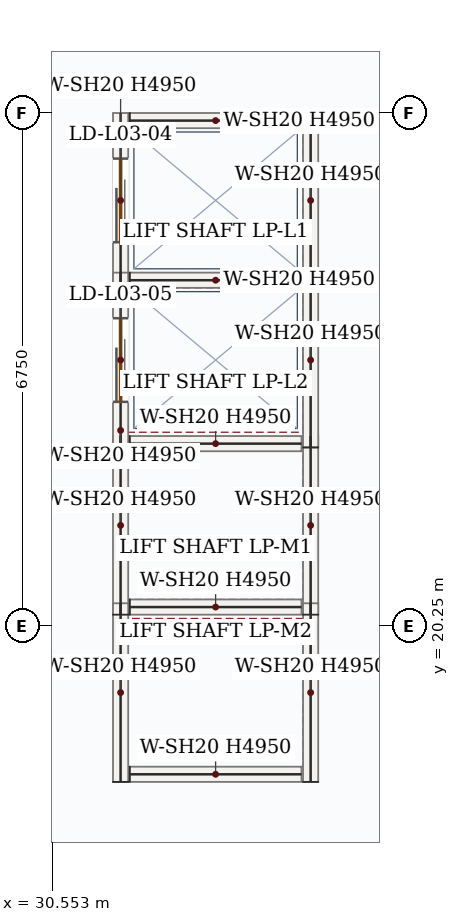
"""IFC4 building model, lengths in metres.
Left out: names, types, materials, properties, quantities, classifications, styles, units other than length and angle.
Written with IfcOpenShell. Run it as: python <this file> out.ifc"""

import sys

from ifc_helpers import new_model, si_unit, direction, frame, frame_2d, origin, place, context, subcontext, project, spatial, rectangle, extrude, source, transform, mapped, element, fill, save


model = new_model("IFC4")
c1 = context("Model", 3, precision=1e-05, world=origin(), true_north=direction((0.0, 1.0)))
c2 = subcontext(c1, "Body", "Model", "MODEL_VIEW")
j1 = project(units=[si_unit("LENGTHUNIT", "METRE"), si_unit("PLANEANGLEUNIT", "RADIAN")], contexts=[c1])
p1 = place(None, origin())
s1 = spatial("IfcSite", under=j1, at=p1, CompositionType="ELEMENT")
p2 = place(p1, origin())
s2 = spatial("IfcBuilding", under=s1, at=p2, CompositionType="ELEMENT")
p3 = place(p2, frame((0.0, 0.0, 18.0)))
s3 = spatial("IfcBuildingStorey", under=s2, at=p3, CompositionType="ELEMENT", Elevation=18.0)
m1 = source(origin(), c2, "Body", "SweptSolid", [
    extrude(rectangle(XDim=2.35, YDim=0.2, at=frame_2d((1.175, 0.0))), origin(), (0.0, 0.0, 1.0), 4.95),
])
for number, where, z_axis, x_axis in (
    (1, (31.45, 20.4, 0.0), (0.0, 0.0, 1.0), (0.0, 1.0, 0.0)),
    (2, (33.95, 20.4, 0.0), (0.0, 0.0, 1.0), (0.0, 1.0, 0.0)),
):
    element("IfcWall", number, at=place(p3, frame(where, z_axis=z_axis, x_axis=x_axis)), inside=s3, PredefinedType="SOLIDWALL", context=c2, shape_type="MappedRepresentation", body=[
        mapped(m1, transform((0.0, 0.0, 0.0), x_axis=(1.0, 0.0, 0.0), y_axis=(0.0, 1.0, 0.0), z_axis=(0.0, 0.0, 1.0), scale=1.0)),
    ])
m2 = source(origin(), c2, "Body", "SweptSolid", [
    extrude(rectangle(XDim=2.26, YDim=0.2, at=frame_2d((1.13, 0.0))), origin(), (0.0, 0.0, 1.0), 4.95),
])
for number, where, z_axis, x_axis in (
    (3, (31.57, 20.5, 0.0), (0.0, 0.0, 1.0), (1.0, 0.0, 0.0)),
    (4, (31.57, 22.65, 0.0), (0.0, 0.0, 1.0), (1.0, 0.0, 0.0)),
):
    element("IfcWall", number, at=place(p3, frame(where, z_axis=z_axis, x_axis=x_axis)), inside=s3, PredefinedType="SOLIDWALL", context=c2, shape_type="MappedRepresentation", body=[
        mapped(m2, transform((0.0, 0.0, 0.0), x_axis=(1.0, 0.0, 0.0), y_axis=(0.0, 1.0, 0.0), z_axis=(0.0, 0.0, 1.0), scale=1.0)),
    ])
for number, where, z_axis, x_axis in (
    (5, (31.45, 18.2, 0.0), (0.0, 0.0, 1.0), (0.0, 1.0, 0.0)),
    (6, (33.95, 18.2, 0.0), (0.0, 0.0, 1.0), (0.0, 1.0, 0.0)),
):
    element("IfcWall", number, at=place(p3, frame(where, z_axis=z_axis, x_axis=x_axis)), inside=s3, PredefinedType="SOLIDWALL", context=c2, shape_type="MappedRepresentation", body=[
        mapped(m1, transform((0.0, 0.0, 0.0), x_axis=(1.0, 0.0, 0.0), y_axis=(0.0, 1.0, 0.0), z_axis=(0.0, 0.0, 1.0), scale=1.0)),
    ])
p4 = place(p3, frame((31.57, 18.3, 0.0), z_axis=(0.0, 0.0, 1.0), x_axis=(1.0, 0.0, 0.0)))
e7 = element("IfcWall", 7, at=p4, inside=s3, PredefinedType="SOLIDWALL", context=c2, shape_type="MappedRepresentation", body=[
    mapped(m2, transform((0.0, 0.0, 0.0), x_axis=(1.0, 0.0, 0.0), y_axis=(0.0, 1.0, 0.0), z_axis=(0.0, 0.0, 1.0), scale=1.0)),
])
p5 = place(p3, frame((31.45, 24.7, 0.0), z_axis=(0.0, 0.0, 1.0), x_axis=(0.0, 1.0, 0.0)))
e8 = element("IfcWall", 8, at=p5, inside=s3, PredefinedType="SOLIDWALL", context=c2, shape_type="SweptSolid", body=[
    extrude(rectangle(XDim=2.3, YDim=0.2, at=frame_2d((1.15, 0.0))), origin(), (0.0, 0.0, 1.0), 4.95),
])
p6 = place(p5, frame((0.6, 0.0, 0.0)))
e9 = element("IfcOpeningElement", 9, at=p6, cuts=e8, PredefinedType="OPENING", context=c2, shape_type="SweptSolid", body=[
    extrude(rectangle(XDim=1.1, YDim=2.15, at=frame_2d((0.55, 1.075))), frame((0.0, 0.11, 0.0), z_axis=(0.0, -1.0, 0.0), x_axis=(1.0, 0.0, 0.0)), (0.0, 0.0, 1.0), 0.22),
])
m3 = source(origin(), c2, "Body", "SweptSolid", [
    extrude(rectangle(XDim=2.3, YDim=0.2, at=frame_2d((1.15, 0.0))), origin(), (0.0, 0.0, 1.0), 4.95),
])
p7 = place(p3, frame((33.95, 24.7, 0.0), z_axis=(0.0, 0.0, 1.0), x_axis=(0.0, 1.0, 0.0)))
e10 = element("IfcWall", 10, at=p7, inside=s3, PredefinedType="SOLIDWALL", context=c2, shape_type="MappedRepresentation", body=[
    mapped(m3, transform((0.0, 0.0, 0.0), x_axis=(1.0, 0.0, 0.0), y_axis=(0.0, 1.0, 0.0), z_axis=(0.0, 0.0, 1.0), scale=1.0)),
])
for number, where, z_axis, x_axis in (
    (11, (31.57, 24.8, 0.0), (0.0, 0.0, 1.0), (1.0, 0.0, 0.0)),
    (12, (31.57, 26.9, 0.0), (0.0, 0.0, 1.0), (1.0, 0.0, 0.0)),
):
    element("IfcWall", number, at=place(p3, frame(where, z_axis=z_axis, x_axis=x_axis)), inside=s3, PredefinedType="SOLIDWALL", context=c2, shape_type="MappedRepresentation", body=[
        mapped(m2, transform((0.0, 0.0, 0.0), x_axis=(1.0, 0.0, 0.0), y_axis=(0.0, 1.0, 0.0), z_axis=(0.0, 0.0, 1.0), scale=1.0)),
    ])
p8 = place(p3, frame((31.45, 22.6, 0.0), z_axis=(0.0, 0.0, 1.0), x_axis=(0.0, 1.0, 0.0)))
e13 = element("IfcWall", 13, at=p8, inside=s3, PredefinedType="SOLIDWALL", context=c2, shape_type="SweptSolid", body=[
    extrude(rectangle(XDim=2.3, YDim=0.2, at=frame_2d((1.15, 0.0))), origin(), (0.0, 0.0, 1.0), 4.95),
])
p9 = place(p8, frame((0.6, 0.0, 0.0)))
e14 = element("IfcOpeningElement", 14, at=p9, cuts=e13, PredefinedType="OPENING", context=c2, shape_type="SweptSolid", body=[
    extrude(rectangle(XDim=1.1, YDim=2.15, at=frame_2d((0.55, 1.075))), frame((0.0, 0.11, 0.0), z_axis=(0.0, -1.0, 0.0), x_axis=(1.0, 0.0, 0.0)), (0.0, 0.0, 1.0), 0.22),
])
m4 = source(origin(), c2, "Body", "SweptSolid", [
    extrude(rectangle(XDim=2.3, YDim=0.2, at=frame_2d((1.15, 0.0))), origin(), (0.0, 0.0, 1.0), 4.95),
])
p10 = place(p3, frame((33.95, 22.6, 0.0), z_axis=(0.0, 0.0, 1.0), x_axis=(0.0, 1.0, 0.0)))
e15 = element("IfcWall", 15, at=p10, inside=s3, PredefinedType="SOLIDWALL", context=c2, shape_type="MappedRepresentation", body=[
    mapped(m4, transform((0.0, 0.0, 0.0), x_axis=(1.0, 0.0, 0.0), y_axis=(0.0, 1.0, 0.0), z_axis=(0.0, 0.0, 1.0), scale=1.0)),
])
m5 = source(origin(), c2, "Body", "SweptSolid", [
    extrude(rectangle(XDim=1.1, YDim=2.15, at=frame_2d((0.55, 1.075))), frame((0.0, 0.025, 0.0), z_axis=(0.0, -1.0, 0.0), x_axis=(1.0, 0.0, 0.0)), (0.0, 0.0, 1.0), 0.05),
])
p11 = place(p6, origin())
e16 = element("IfcDoor", 16, at=p11, inside=s3, OperationType="DOUBLE_DOOR_SLIDING", PredefinedType="DOOR", context=c2, shape_type="MappedRepresentation", body=[
    mapped(m5, transform((0.0, 0.0, 0.0), x_axis=(1.0, 0.0, 0.0), y_axis=(0.0, 1.0, 0.0), z_axis=(0.0, 0.0, 1.0), scale=1.0)),
])
fill(e9, e16)
p12 = place(p9, origin())
e17 = element("IfcDoor", 17, at=p12, inside=s3, OperationType="DOUBLE_DOOR_SLIDING", PredefinedType="DOOR", context=c2, shape_type="MappedRepresentation", body=[
    mapped(m5, transform((0.0, 0.0, 0.0), x_axis=(1.0, 0.0, 0.0), y_axis=(0.0, 1.0, 0.0), z_axis=(0.0, 0.0, 1.0), scale=1.0)),
])
fill(e14, e17)
save(model, sys.argv[1])
